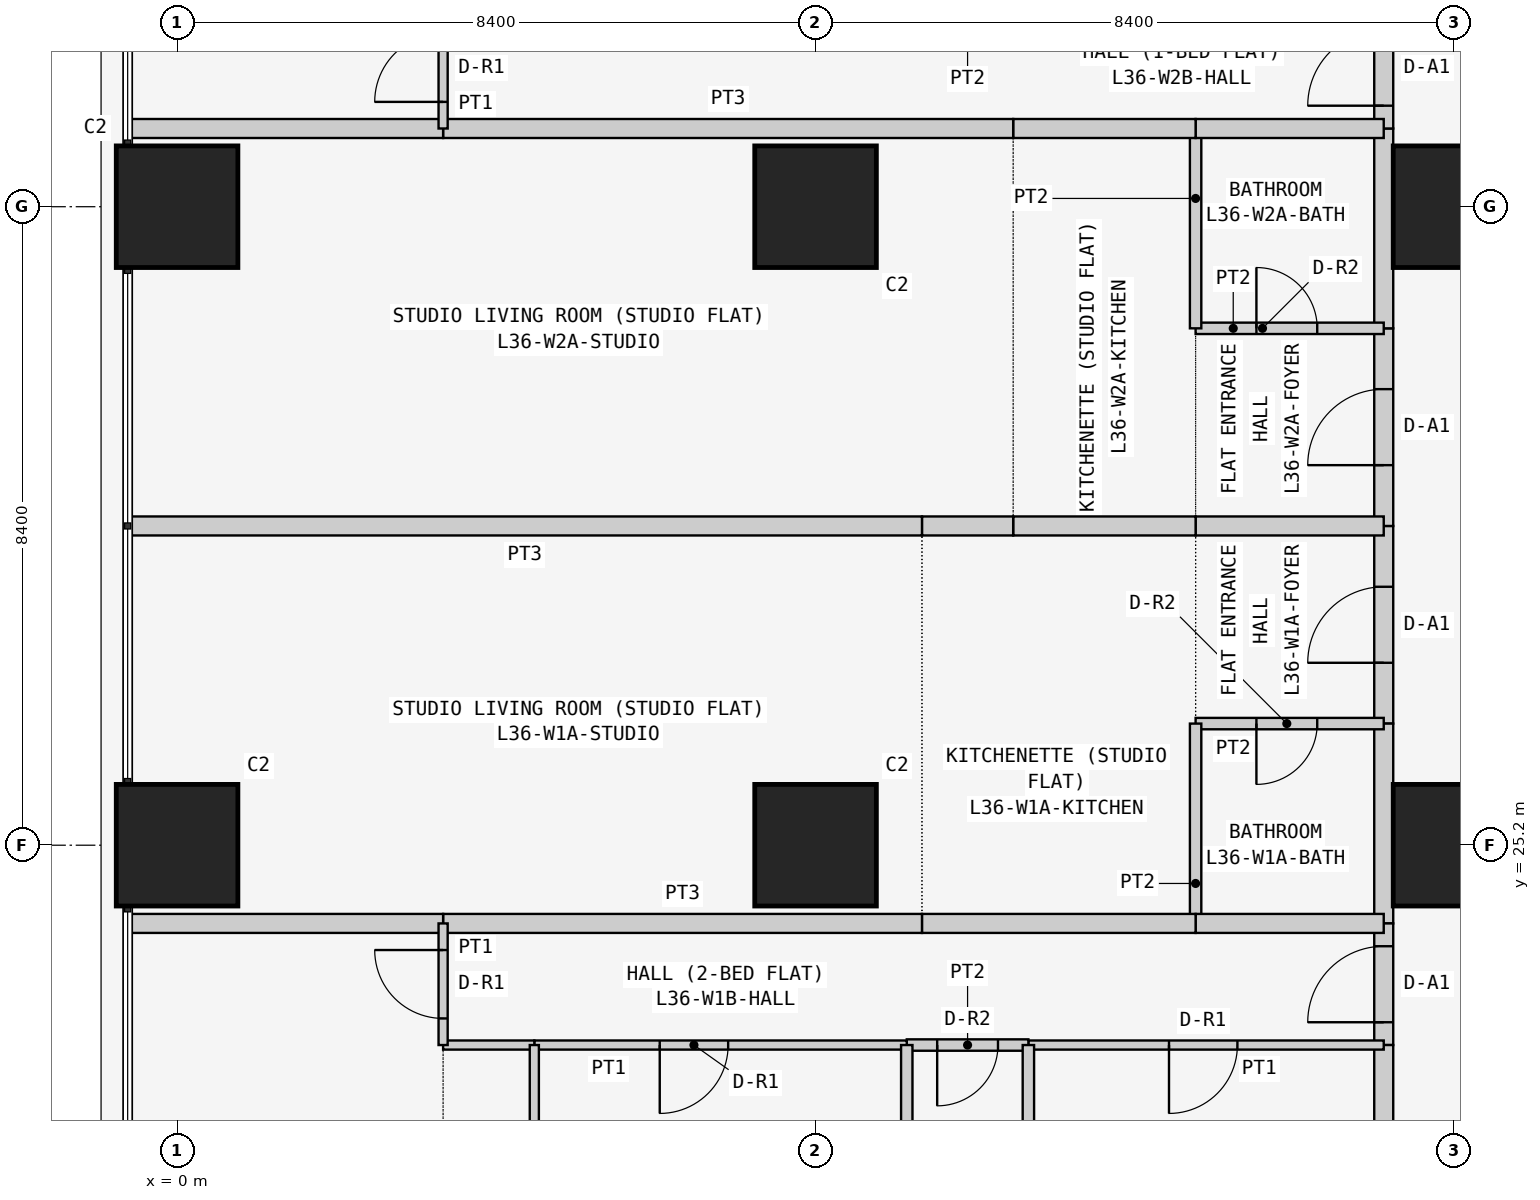
"""IFC4 building model, lengths in metres.
Left out: names, types, materials, properties, quantities, classifications, styles, units other than length and angle.
Written with IfcOpenShell. Run it as: python <this file> out.ifc"""

import sys

from ifc_helpers import new_model, si_unit, direction, frame, frame_2d, origin, origin_2d, place, context, subcontext, project, spatial, rectangle, extrude, element, fill, save


model = new_model("IFC4")
c1 = context("Model", 3, precision=1e-05, world=origin(), true_north=direction((0.0, 1.0)))
c2 = subcontext(c1, "Body", "Model", "MODEL_VIEW")
j1 = project(units=[si_unit("LENGTHUNIT", "METRE"), si_unit("PLANEANGLEUNIT", "RADIAN")], contexts=[c1])
p1 = place(None, origin())
s1 = spatial("IfcSite", under=j1, at=p1, CompositionType="ELEMENT")
p2 = place(p1, origin())
s2 = spatial("IfcBuilding", under=s1, at=p2, CompositionType="ELEMENT")
p3 = place(p2, frame((0.0, 0.0, 141.3)))
s3 = spatial("IfcBuildingStorey", under=s2, at=p3, CompositionType="ELEMENT", Elevation=141.3)
for number, where, z_axis, x_axis in (
    (1, (0.0, 25.2, 0.0), (0.0, 0.0, 1.0), (1.0, 0.0, 0.0)),
    (2, (0.0, 33.6, 0.0), (0.0, 0.0, 1.0), (1.0, 0.0, 0.0)),
    (3, (8.4, 25.2, 0.0), (0.0, 0.0, 1.0), (1.0, 0.0, 0.0)),
    (4, (8.4, 33.6, 0.0), (0.0, 0.0, 1.0), (1.0, 0.0, 0.0)),
    (5, (16.8, 25.2, 0.0), (0.0, 0.0, 1.0), (1.0, 0.0, 0.0)),
    (6, (16.8, 33.6, 0.0), (0.0, 0.0, 1.0), (1.0, 0.0, 0.0)),
):
    element("IfcColumn", number, at=place(p3, frame(where, z_axis=z_axis, x_axis=x_axis)), inside=s3, PredefinedType="COLUMN", context=c2, shape_type="SweptSolid", body=[
        extrude(rectangle(XDim=1.6, YDim=1.6, at=origin_2d()), origin(), (0.0, 0.0, 1.0), 3.6),
    ])
p4 = place(p3, frame((15.875, 26.8, 0.0), z_axis=(0.0, 0.0, 1.0), x_axis=(0.0, 1.0, 0.0)))
e7 = element("IfcWall", 7, at=p4, inside=s3, PredefinedType="PARTITIONING", context=c2, shape_type="SweptSolid", body=[
    extrude(rectangle(XDim=2.6, YDim=0.25, at=frame_2d((1.3, 0.0))), origin(), (0.0, 0.0, 1.0), 3.45),
])
p5 = place(p4, frame((0.8, 0.0, 0.0)))
e8 = element("IfcOpeningElement", 8, at=p5, cuts=e7, PredefinedType="OPENING", context=c2, shape_type="SweptSolid", body=[
    extrude(rectangle(XDim=1.0, YDim=2.1, at=frame_2d((0.5, 1.05))), frame((0.0, 0.135, 0.0), z_axis=(0.0, -1.0, 0.0), x_axis=(1.0, 0.0, 0.0)), (0.0, 0.0, 1.0), 0.27),
])
p6 = place(p3, frame((15.875, 24.171, 0.0), z_axis=(0.0, 0.0, 1.0), x_axis=(0.0, 1.0, 0.0)))
e9 = element("IfcWall", 9, at=p6, inside=s3, PredefinedType="PARTITIONING", context=c2, shape_type="SweptSolid", body=[
    extrude(rectangle(XDim=2.629, YDim=0.25, at=frame_2d((1.314, 0.0))), origin(), (0.0, 0.0, 1.0), 3.45),
])
p7 = place(p3, frame((15.875, 22.571, 0.0), z_axis=(0.0, 0.0, 1.0), x_axis=(0.0, 1.0, 0.0)))
e10 = element("IfcWall", 10, at=p7, inside=s3, PredefinedType="PARTITIONING", context=c2, shape_type="SweptSolid", body=[
    extrude(rectangle(XDim=1.6, YDim=0.25, at=frame_2d((0.8, 0.0))), origin(), (0.0, 0.0, 1.0), 3.45),
])
p8 = place(p7, frame((0.3, 0.0, 0.0)))
e11 = element("IfcOpeningElement", 11, at=p8, cuts=e10, PredefinedType="OPENING", context=c2, shape_type="SweptSolid", body=[
    extrude(rectangle(XDim=1.0, YDim=2.1, at=frame_2d((0.5, 1.05))), frame((0.0, 0.135, 0.0), z_axis=(0.0, -1.0, 0.0), x_axis=(1.0, 0.0, 0.0)), (0.0, 0.0, 1.0), 0.27),
])
p9 = place(p3, frame((15.875, 16.1, 0.0), z_axis=(0.0, 0.0, 1.0), x_axis=(0.0, 1.0, 0.0)))
e12 = element("IfcWall", 12, at=p9, inside=s3, PredefinedType="PARTITIONING", context=c2, shape_type="SweptSolid", body=[
    extrude(rectangle(XDim=6.471, YDim=0.25, at=frame_2d((3.235, 0.0))), origin(), (0.0, 0.0, 1.0), 3.45),
])
p10 = place(p3, frame((15.875, 29.4, 0.0), z_axis=(0.0, 0.0, 1.0), x_axis=(0.0, 1.0, 0.0)))
e13 = element("IfcWall", 13, at=p10, inside=s3, PredefinedType="PARTITIONING", context=c2, shape_type="SweptSolid", body=[
    extrude(rectangle(XDim=2.6, YDim=0.25, at=frame_2d((1.3, 0.0))), origin(), (0.0, 0.0, 1.0), 3.45),
])
p11 = place(p10, frame((0.8, 0.0, 0.0)))
e14 = element("IfcOpeningElement", 14, at=p11, cuts=e13, PredefinedType="OPENING", context=c2, shape_type="SweptSolid", body=[
    extrude(rectangle(XDim=1.0, YDim=2.1, at=frame_2d((0.5, 1.05))), frame((0.0, 0.135, 0.0), z_axis=(0.0, -1.0, 0.0), x_axis=(1.0, 0.0, 0.0)), (0.0, 0.0, 1.0), 0.27),
])
p12 = place(p3, frame((15.875, 32.0, 0.0), z_axis=(0.0, 0.0, 1.0), x_axis=(0.0, 1.0, 0.0)))
e15 = element("IfcWall", 15, at=p12, inside=s3, PredefinedType="PARTITIONING", context=c2, shape_type="SweptSolid", body=[
    extrude(rectangle(XDim=2.629, YDim=0.25, at=frame_2d((1.314, 0.0))), origin(), (0.0, 0.0, 1.0), 3.45),
])
p13 = place(p3, frame((15.875, 34.629, 0.0), z_axis=(0.0, 0.0, 1.0), x_axis=(0.0, 1.0, 0.0)))
e16 = element("IfcWall", 16, at=p13, inside=s3, PredefinedType="PARTITIONING", context=c2, shape_type="SweptSolid", body=[
    extrude(rectangle(XDim=1.6, YDim=0.25, at=frame_2d((0.8, 0.0))), origin(), (0.0, 0.0, 1.0), 3.45),
])
p14 = place(p13, frame((0.3, 0.0, 0.0)))
e17 = element("IfcOpeningElement", 17, at=p14, cuts=e16, PredefinedType="OPENING", context=c2, shape_type="SweptSolid", body=[
    extrude(rectangle(XDim=1.0, YDim=2.1, at=frame_2d((0.5, 1.05))), frame((0.0, 0.135, 0.0), z_axis=(0.0, -1.0, 0.0), x_axis=(1.0, 0.0, 0.0)), (0.0, 0.0, 1.0), 0.27),
])
p15 = place(p3, frame((13.4, 26.8, 0.0), z_axis=(0.0, 0.0, 1.0), x_axis=(1.0, 0.0, 0.0)))
e18 = element("IfcWall", 18, at=p15, inside=s3, PredefinedType="PARTITIONING", context=c2, shape_type="SweptSolid", body=[
    extrude(rectangle(XDim=2.475, YDim=0.15, at=frame_2d((1.238, 0.0))), origin(), (0.0, 0.0, 1.0), 3.45),
])
p16 = place(p15, frame((0.8, 0.0, 0.0)))
e19 = element("IfcOpeningElement", 19, at=p16, cuts=e18, PredefinedType="OPENING", context=c2, shape_type="SweptSolid", body=[
    extrude(rectangle(XDim=0.8, YDim=2.1, at=frame_2d((0.4, 1.05))), frame((0.0, 0.085, 0.0), z_axis=(0.0, -1.0, 0.0), x_axis=(1.0, 0.0, 0.0)), (0.0, 0.0, 1.0), 0.17),
])
p17 = place(p3, frame((15.875, 29.4, 0.0), z_axis=(0.0, 0.0, 1.0), x_axis=(-1.0, 0.0, 0.0)))
e20 = element("IfcWall", 20, at=p17, inside=s3, PredefinedType="PARTITIONING", context=c2, shape_type="SweptSolid", body=[
    extrude(rectangle(XDim=2.475, YDim=0.25, at=frame_2d((1.238, 0.0))), origin(), (0.0, 0.0, 1.0), 3.45),
])
p18 = place(p3, frame((13.4, 26.8, 0.0), z_axis=(0.0, 0.0, 1.0), x_axis=(0.0, -1.0, 0.0)))
e21 = element("IfcWall", 21, at=p18, inside=s3, PredefinedType="PARTITIONING", context=c2, shape_type="SweptSolid", body=[
    extrude(rectangle(XDim=2.629, YDim=0.15, at=frame_2d((1.314, 0.0))), origin(), (0.0, 0.0, 1.0), 3.45),
])
p19 = place(p3, frame((13.4, 24.171, 0.0), z_axis=(0.0, 0.0, 1.0), x_axis=(1.0, 0.0, 0.0)))
e22 = element("IfcWall", 22, at=p19, inside=s3, PredefinedType="PARTITIONING", context=c2, shape_type="SweptSolid", body=[
    extrude(rectangle(XDim=2.475, YDim=0.25, at=frame_2d((1.238, 0.0))), origin(), (0.0, 0.0, 1.0), 3.45),
])
p20 = place(p3, frame((9.8, 24.171, 0.0), z_axis=(0.0, 0.0, 1.0), x_axis=(1.0, 0.0, 0.0)))
e23 = element("IfcWall", 23, at=p20, inside=s3, PredefinedType="PARTITIONING", context=c2, shape_type="SweptSolid", body=[
    extrude(rectangle(XDim=3.6, YDim=0.25, at=frame_2d((1.8, 0.0))), origin(), (0.0, 0.0, 1.0), 3.45),
])
p21 = place(p3, frame((13.4, 29.4, 0.0), z_axis=(0.0, 0.0, 1.0), x_axis=(-1.0, 0.0, 0.0)))
e24 = element("IfcWall", 24, at=p21, inside=s3, PredefinedType="PARTITIONING", context=c2, shape_type="SweptSolid", body=[
    extrude(rectangle(XDim=2.4, YDim=0.25, at=frame_2d((1.2, 0.0))), origin(), (0.0, 0.0, 1.0), 3.45),
])
p22 = place(p3, frame((11.0, 29.4, 0.0), z_axis=(0.0, 0.0, 1.0), x_axis=(-1.0, 0.0, 0.0)))
e25 = element("IfcWall", 25, at=p22, inside=s3, PredefinedType="PARTITIONING", context=c2, shape_type="SweptSolid", body=[
    extrude(rectangle(XDim=1.2, YDim=0.25, at=frame_2d((0.6, 0.0))), origin(), (0.0, 0.0, 1.0), 3.45),
])
p23 = place(p3, frame((3.5, 24.171, 0.0), z_axis=(0.0, 0.0, 1.0), x_axis=(1.0, 0.0, 0.0)))
e26 = element("IfcWall", 26, at=p23, inside=s3, PredefinedType="PARTITIONING", context=c2, shape_type="SweptSolid", body=[
    extrude(rectangle(XDim=6.3, YDim=0.25, at=frame_2d((3.15, 0.0))), origin(), (0.0, 0.0, 1.0), 3.45),
])
p24 = place(p3, frame((-0.65, 24.171, 0.0), z_axis=(0.0, 0.0, 1.0), x_axis=(1.0, 0.0, 0.0)))
e27 = element("IfcWall", 27, at=p24, inside=s3, PredefinedType="PARTITIONING", context=c2, shape_type="SweptSolid", body=[
    extrude(rectangle(XDim=4.15, YDim=0.25, at=frame_2d((2.075, 0.0))), origin(), (0.0, 0.0, 1.0), 3.45),
])
p25 = place(p3, frame((9.8, 29.4, 0.0), z_axis=(0.0, 0.0, 1.0), x_axis=(-1.0, 0.0, 0.0)))
e28 = element("IfcWall", 28, at=p25, inside=s3, PredefinedType="PARTITIONING", context=c2, shape_type="SweptSolid", body=[
    extrude(rectangle(XDim=10.45, YDim=0.25, at=frame_2d((5.225, 0.0))), origin(), (0.0, 0.0, 1.0), 3.45),
])
p26 = place(p3, frame((11.2, 22.571, 0.0), z_axis=(0.0, 0.0, 1.0), x_axis=(1.0, 0.0, 0.0)))
e29 = element("IfcWall", 29, at=p26, inside=s3, PredefinedType="PARTITIONING", context=c2, shape_type="SweptSolid", body=[
    extrude(rectangle(XDim=4.675, YDim=0.12, at=frame_2d((2.337, 0.0))), origin(), (0.0, 0.0, 1.0), 3.45),
])
p27 = place(p26, frame((1.85, 0.0, 0.0)))
e30 = element("IfcOpeningElement", 30, at=p27, cuts=e29, PredefinedType="OPENING", context=c2, shape_type="SweptSolid", body=[
    extrude(rectangle(XDim=0.9, YDim=2.1, at=frame_2d((0.45, 1.05))), frame((0.0, 0.07, 0.0), z_axis=(0.0, -1.0, 0.0), x_axis=(1.0, 0.0, 0.0)), (0.0, 0.0, 1.0), 0.14),
])
p28 = place(p3, frame((9.6, 22.571, 0.0), z_axis=(0.0, 0.0, 1.0), x_axis=(1.0, 0.0, 0.0)))
e31 = element("IfcWall", 31, at=p28, inside=s3, PredefinedType="PARTITIONING", context=c2, shape_type="SweptSolid", body=[
    extrude(rectangle(XDim=1.6, YDim=0.15, at=frame_2d((0.8, 0.0))), origin(), (0.0, 0.0, 1.0), 3.45),
])
p29 = place(p28, frame((0.4, 0.0, 0.0)))
e32 = element("IfcOpeningElement", 32, at=p29, cuts=e31, PredefinedType="OPENING", context=c2, shape_type="SweptSolid", body=[
    extrude(rectangle(XDim=0.8, YDim=2.1, at=frame_2d((0.4, 1.05))), frame((0.0, 0.085, 0.0), z_axis=(0.0, -1.0, 0.0), x_axis=(1.0, 0.0, 0.0)), (0.0, 0.0, 1.0), 0.17),
])
p30 = place(p3, frame((4.7, 22.571, 0.0), z_axis=(0.0, 0.0, 1.0), x_axis=(1.0, 0.0, 0.0)))
e33 = element("IfcWall", 33, at=p30, inside=s3, PredefinedType="PARTITIONING", context=c2, shape_type="SweptSolid", body=[
    extrude(rectangle(XDim=4.9, YDim=0.12, at=frame_2d((2.45, 0.0))), origin(), (0.0, 0.0, 1.0), 3.45),
])
p31 = place(p30, frame((1.65, 0.0, 0.0)))
e34 = element("IfcOpeningElement", 34, at=p31, cuts=e33, PredefinedType="OPENING", context=c2, shape_type="SweptSolid", body=[
    extrude(rectangle(XDim=0.9, YDim=2.1, at=frame_2d((0.45, 1.05))), frame((0.0, 0.07, 0.0), z_axis=(0.0, -1.0, 0.0), x_axis=(1.0, 0.0, 0.0)), (0.0, 0.0, 1.0), 0.14),
])
p32 = place(p3, frame((3.5, 22.571, 0.0), z_axis=(0.0, 0.0, 1.0), x_axis=(1.0, 0.0, 0.0)))
e35 = element("IfcWall", 35, at=p32, inside=s3, PredefinedType="PARTITIONING", context=c2, shape_type="SweptSolid", body=[
    extrude(rectangle(XDim=1.2, YDim=0.12, at=frame_2d((0.6, 0.0))), origin(), (0.0, 0.0, 1.0), 3.45),
])
p33 = place(p3, frame((3.5, 24.171, 0.0), z_axis=(0.0, 0.0, 1.0), x_axis=(0.0, -1.0, 0.0)))
e36 = element("IfcWall", 36, at=p33, inside=s3, PredefinedType="PARTITIONING", context=c2, shape_type="SweptSolid", body=[
    extrude(rectangle(XDim=1.6, YDim=0.12, at=frame_2d((0.8, 0.0))), origin(), (0.0, 0.0, 1.0), 3.45),
])
p34 = place(p33, frame((0.35, 0.0, 0.0)))
e37 = element("IfcOpeningElement", 37, at=p34, cuts=e36, PredefinedType="OPENING", context=c2, shape_type="SweptSolid", body=[
    extrude(rectangle(XDim=0.9, YDim=2.1, at=frame_2d((0.45, 1.05))), frame((0.0, 0.07, 0.0), z_axis=(0.0, -1.0, 0.0), x_axis=(1.0, 0.0, 0.0)), (0.0, 0.0, 1.0), 0.14),
])
for number, where, z_axis, x_axis in (
    (38, (11.2, 22.571, 0.0), (0.0, 0.0, 1.0), (0.0, -1.0, 0.0)),
    (39, (9.6, 22.571, 0.0), (0.0, 0.0, 1.0), (0.0, -1.0, 0.0)),
):
    element("IfcWall", number, at=place(p3, frame(where, z_axis=z_axis, x_axis=x_axis)), inside=s3, PredefinedType="PARTITIONING", context=c2, shape_type="SweptSolid", body=[
        extrude(rectangle(XDim=6.471, YDim=0.15, at=frame_2d((3.235, 0.0))), origin(), (0.0, 0.0, 1.0), 3.45),
    ])
p35 = place(p3, frame((4.7, 22.571, 0.0), z_axis=(0.0, 0.0, 1.0), x_axis=(0.0, -1.0, 0.0)))
e40 = element("IfcWall", 40, at=p35, inside=s3, PredefinedType="PARTITIONING", context=c2, shape_type="SweptSolid", body=[
    extrude(rectangle(XDim=6.471, YDim=0.12, at=frame_2d((3.235, 0.0))), origin(), (0.0, 0.0, 1.0), 3.45),
])
p36 = place(p3, frame((13.4, 32.0, 0.0), z_axis=(0.0, 0.0, 1.0), x_axis=(1.0, 0.0, 0.0)))
e41 = element("IfcWall", 41, at=p36, inside=s3, PredefinedType="PARTITIONING", context=c2, shape_type="SweptSolid", body=[
    extrude(rectangle(XDim=2.475, YDim=0.15, at=frame_2d((1.238, 0.0))), origin(), (0.0, 0.0, 1.0), 3.45),
])
p37 = place(p36, frame((0.8, 0.0, 0.0)))
e42 = element("IfcOpeningElement", 42, at=p37, cuts=e41, PredefinedType="OPENING", context=c2, shape_type="SweptSolid", body=[
    extrude(rectangle(XDim=0.8, YDim=2.1, at=frame_2d((0.4, 1.05))), frame((0.0, 0.085, 0.0), z_axis=(0.0, -1.0, 0.0), x_axis=(1.0, 0.0, 0.0)), (0.0, 0.0, 1.0), 0.17),
])
p38 = place(p3, frame((13.4, 32.0, 0.0), z_axis=(0.0, 0.0, 1.0), x_axis=(0.0, 1.0, 0.0)))
e43 = element("IfcWall", 43, at=p38, inside=s3, PredefinedType="PARTITIONING", context=c2, shape_type="SweptSolid", body=[
    extrude(rectangle(XDim=2.629, YDim=0.15, at=frame_2d((1.314, 0.0))), origin(), (0.0, 0.0, 1.0), 3.45),
])
p39 = place(p3, frame((13.4, 34.629, 0.0), z_axis=(0.0, 0.0, 1.0), x_axis=(1.0, 0.0, 0.0)))
e44 = element("IfcWall", 44, at=p39, inside=s3, PredefinedType="PARTITIONING", context=c2, shape_type="SweptSolid", body=[
    extrude(rectangle(XDim=2.475, YDim=0.25, at=frame_2d((1.238, 0.0))), origin(), (0.0, 0.0, 1.0), 3.45),
])
p40 = place(p3, frame((11.0, 34.629, 0.0), z_axis=(0.0, 0.0, 1.0), x_axis=(1.0, 0.0, 0.0)))
e45 = element("IfcWall", 45, at=p40, inside=s3, PredefinedType="PARTITIONING", context=c2, shape_type="SweptSolid", body=[
    extrude(rectangle(XDim=2.4, YDim=0.25, at=frame_2d((1.2, 0.0))), origin(), (0.0, 0.0, 1.0), 3.45),
])
p41 = place(p3, frame((3.5, 34.629, 0.0), z_axis=(0.0, 0.0, 1.0), x_axis=(1.0, 0.0, 0.0)))
e46 = element("IfcWall", 46, at=p41, inside=s3, PredefinedType="PARTITIONING", context=c2, shape_type="SweptSolid", body=[
    extrude(rectangle(XDim=7.5, YDim=0.25, at=frame_2d((3.75, 0.0))), origin(), (0.0, 0.0, 1.0), 3.45),
])
p42 = place(p3, frame((-0.65, 34.629, 0.0), z_axis=(0.0, 0.0, 1.0), x_axis=(1.0, 0.0, 0.0)))
e47 = element("IfcWall", 47, at=p42, inside=s3, PredefinedType="PARTITIONING", context=c2, shape_type="SweptSolid", body=[
    extrude(rectangle(XDim=4.15, YDim=0.25, at=frame_2d((2.075, 0.0))), origin(), (0.0, 0.0, 1.0), 3.45),
])
p43 = place(p3, frame((3.5, 34.629, 0.0), z_axis=(0.0, 0.0, 1.0), x_axis=(0.0, 1.0, 0.0)))
e48 = element("IfcWall", 48, at=p43, inside=s3, PredefinedType="PARTITIONING", context=c2, shape_type="SweptSolid", body=[
    extrude(rectangle(XDim=1.6, YDim=0.12, at=frame_2d((0.8, 0.0))), origin(), (0.0, 0.0, 1.0), 3.45),
])
p44 = place(p43, frame((0.35, 0.0, 0.0)))
e49 = element("IfcOpeningElement", 49, at=p44, cuts=e48, PredefinedType="OPENING", context=c2, shape_type="SweptSolid", body=[
    extrude(rectangle(XDim=0.9, YDim=2.1, at=frame_2d((0.45, 1.05))), frame((0.0, 0.07, 0.0), z_axis=(0.0, -1.0, 0.0), x_axis=(1.0, 0.0, 0.0)), (0.0, 0.0, 1.0), 0.14),
])
p45 = place(p5, origin())
e50 = element("IfcDoor", 50, at=p45, inside=s3, OperationType="SINGLE_SWING_LEFT", PredefinedType="DOOR", context=c2, shape_type="SweptSolid", body=[
    extrude(rectangle(XDim=1.0, YDim=2.1, at=frame_2d((0.5, 1.05))), frame((0.0, 0.025, 0.0), z_axis=(0.0, -1.0, 0.0), x_axis=(1.0, 0.0, 0.0)), (0.0, 0.0, 1.0), 0.05),
])
fill(e8, e50)
p46 = place(p16, frame((0.8, 0.0, 0.0), z_axis=(0.0, 0.0, 1.0), x_axis=(-1.0, 0.0, 0.0)))
e51 = element("IfcDoor", 51, at=p46, inside=s3, OperationType="SINGLE_SWING_RIGHT", PredefinedType="DOOR", context=c2, shape_type="SweptSolid", body=[
    extrude(rectangle(XDim=0.8, YDim=2.1, at=frame_2d((0.4, 1.05))), frame((0.0, 0.025, 0.0), z_axis=(0.0, -1.0, 0.0), x_axis=(1.0, 0.0, 0.0)), (0.0, 0.0, 1.0), 0.05),
])
fill(e19, e51)
p47 = place(p8, origin())
e52 = element("IfcDoor", 52, at=p47, inside=s3, OperationType="SINGLE_SWING_LEFT", PredefinedType="DOOR", context=c2, shape_type="SweptSolid", body=[
    extrude(rectangle(XDim=1.0, YDim=2.1, at=frame_2d((0.5, 1.05))), frame((0.0, 0.025, 0.0), z_axis=(0.0, -1.0, 0.0), x_axis=(1.0, 0.0, 0.0)), (0.0, 0.0, 1.0), 0.05),
])
fill(e11, e52)
p48 = place(p27, frame((0.9, 0.0, 0.0), z_axis=(0.0, 0.0, 1.0), x_axis=(-1.0, 0.0, 0.0)))
e53 = element("IfcDoor", 53, at=p48, inside=s3, OperationType="SINGLE_SWING_RIGHT", PredefinedType="DOOR", context=c2, shape_type="SweptSolid", body=[
    extrude(rectangle(XDim=0.9, YDim=2.1, at=frame_2d((0.45, 1.05))), frame((0.0, 0.025, 0.0), z_axis=(0.0, -1.0, 0.0), x_axis=(1.0, 0.0, 0.0)), (0.0, 0.0, 1.0), 0.05),
])
fill(e30, e53)
p49 = place(p29, frame((0.8, 0.0, 0.0), z_axis=(0.0, 0.0, 1.0), x_axis=(-1.0, 0.0, 0.0)))
e54 = element("IfcDoor", 54, at=p49, inside=s3, OperationType="SINGLE_SWING_RIGHT", PredefinedType="DOOR", context=c2, shape_type="SweptSolid", body=[
    extrude(rectangle(XDim=0.8, YDim=2.1, at=frame_2d((0.4, 1.05))), frame((0.0, 0.025, 0.0), z_axis=(0.0, -1.0, 0.0), x_axis=(1.0, 0.0, 0.0)), (0.0, 0.0, 1.0), 0.05),
])
fill(e32, e54)
p50 = place(p31, frame((0.9, 0.0, 0.0), z_axis=(0.0, 0.0, 1.0), x_axis=(-1.0, 0.0, 0.0)))
e55 = element("IfcDoor", 55, at=p50, inside=s3, OperationType="SINGLE_SWING_RIGHT", PredefinedType="DOOR", context=c2, shape_type="SweptSolid", body=[
    extrude(rectangle(XDim=0.9, YDim=2.1, at=frame_2d((0.45, 1.05))), frame((0.0, 0.025, 0.0), z_axis=(0.0, -1.0, 0.0), x_axis=(1.0, 0.0, 0.0)), (0.0, 0.0, 1.0), 0.05),
])
fill(e34, e55)
p51 = place(p34, frame((0.9, 0.0, 0.0), z_axis=(0.0, 0.0, 1.0), x_axis=(-1.0, 0.0, 0.0)))
e56 = element("IfcDoor", 56, at=p51, inside=s3, OperationType="SINGLE_SWING_RIGHT", PredefinedType="DOOR", context=c2, shape_type="SweptSolid", body=[
    extrude(rectangle(XDim=0.9, YDim=2.1, at=frame_2d((0.45, 1.05))), frame((0.0, 0.025, 0.0), z_axis=(0.0, -1.0, 0.0), x_axis=(1.0, 0.0, 0.0)), (0.0, 0.0, 1.0), 0.05),
])
fill(e37, e56)
p52 = place(p11, origin())
e57 = element("IfcDoor", 57, at=p52, inside=s3, OperationType="SINGLE_SWING_LEFT", PredefinedType="DOOR", context=c2, shape_type="SweptSolid", body=[
    extrude(rectangle(XDim=1.0, YDim=2.1, at=frame_2d((0.5, 1.05))), frame((0.0, 0.025, 0.0), z_axis=(0.0, -1.0, 0.0), x_axis=(1.0, 0.0, 0.0)), (0.0, 0.0, 1.0), 0.05),
])
fill(e14, e57)
p53 = place(p37, origin())
e58 = element("IfcDoor", 58, at=p53, inside=s3, OperationType="SINGLE_SWING_LEFT", PredefinedType="DOOR", context=c2, shape_type="SweptSolid", body=[
    extrude(rectangle(XDim=0.8, YDim=2.1, at=frame_2d((0.4, 1.05))), frame((0.0, 0.025, 0.0), z_axis=(0.0, -1.0, 0.0), x_axis=(1.0, 0.0, 0.0)), (0.0, 0.0, 1.0), 0.05),
])
fill(e42, e58)
p54 = place(p14, origin())
e59 = element("IfcDoor", 59, at=p54, inside=s3, OperationType="SINGLE_SWING_LEFT", PredefinedType="DOOR", context=c2, shape_type="SweptSolid", body=[
    extrude(rectangle(XDim=1.0, YDim=2.1, at=frame_2d((0.5, 1.05))), frame((0.0, 0.025, 0.0), z_axis=(0.0, -1.0, 0.0), x_axis=(1.0, 0.0, 0.0)), (0.0, 0.0, 1.0), 0.05),
])
fill(e17, e59)
p55 = place(p44, origin())
e60 = element("IfcDoor", 60, at=p55, inside=s3, OperationType="SINGLE_SWING_LEFT", PredefinedType="DOOR", context=c2, shape_type="SweptSolid", body=[
    extrude(rectangle(XDim=0.9, YDim=2.1, at=frame_2d((0.45, 1.05))), frame((0.0, 0.025, 0.0), z_axis=(0.0, -1.0, 0.0), x_axis=(1.0, 0.0, 0.0)), (0.0, 0.0, 1.0), 0.05),
])
fill(e49, e60)
save(model, sys.argv[1])
